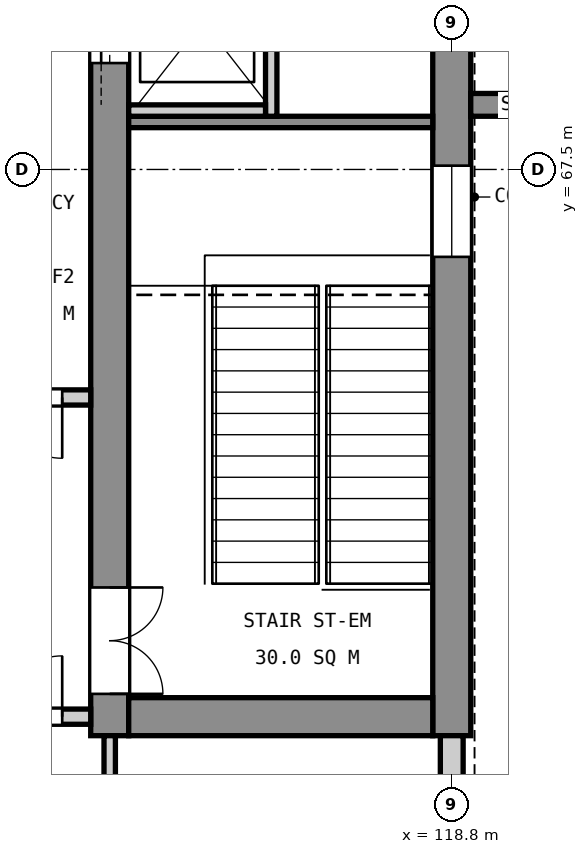
"""IFC4 building model, lengths in metres.
Left out: names, types, materials, properties, quantities, classifications, styles, units other than length and angle.
Written with IfcOpenShell. Run it as: python <this file> out.ifc"""

import sys

from ifc_helpers import new_model, si_unit, direction, frame, frame_2d, origin, place, context, subcontext, project, spatial, rectangle, extrude, element, fill, save


model = new_model("IFC4")
c1 = context("Model", 3, precision=1e-05, world=origin(), true_north=direction((0.0, 1.0)))
c2 = subcontext(c1, "Body", "Model", "MODEL_VIEW")
j1 = project(units=[si_unit("LENGTHUNIT", "METRE"), si_unit("PLANEANGLEUNIT", "RADIAN")], contexts=[c1])
p1 = place(None, origin())
s1 = spatial("IfcSite", under=j1, at=p1, CompositionType="ELEMENT")
p2 = place(p1, origin())
s2 = spatial("IfcBuilding", under=s1, at=p2, CompositionType="ELEMENT")
p3 = place(p2, frame((0.0, 0.0, 11.4)))
s3 = spatial("IfcBuildingStorey", under=s2, at=p3, CompositionType="ELEMENT", Elevation=11.4)
p4 = place(p3, frame((118.8, 60.05, 0.0), z_axis=(0.0, 0.0, 1.0), x_axis=(0.0, 1.0, 0.0)))
e1 = element("IfcWall", 1, at=p4, inside=s3, PredefinedType="SHEAR", context=c2, shape_type="SweptSolid", body=[
    extrude(rectangle(XDim=14.9, YDim=0.5, at=frame_2d((7.45, 0.0))), origin(), (0.0, 0.0, 1.0), 5.1),
])
p5 = place(p4, frame((6.3, 0.0, 3.4)))
e2 = element("IfcOpeningElement", 2, at=p5, cuts=e1, PredefinedType="OPENING", context=c2, shape_type="SweptSolid", body=[
    extrude(rectangle(XDim=1.2, YDim=0.9, at=frame_2d((0.6, 0.45))), frame((0.0, 0.26, 0.0), z_axis=(0.0, -1.0, 0.0), x_axis=(1.0, 0.0, 0.0)), (0.0, 0.0, 1.0), 0.52),
])
p6 = place(p3, frame((114.3, 60.05, 0.0), z_axis=(0.0, 0.0, 1.0), x_axis=(0.0, 1.0, 0.0)))
e3 = element("IfcWall", 3, at=p6, inside=s3, PredefinedType="SHEAR", context=c2, shape_type="SweptSolid", body=[
    extrude(rectangle(XDim=14.9, YDim=0.5, at=frame_2d((7.45, 0.0))), origin(), (0.0, 0.0, 1.0), 5.1),
])
p7 = place(p6, frame((0.55, 0.0, 0.0)))
e4 = element("IfcOpeningElement", 4, at=p7, cuts=e3, PredefinedType="OPENING", context=c2, shape_type="SweptSolid", body=[
    extrude(rectangle(XDim=1.4, YDim=2.1, at=frame_2d((0.7, 1.05))), frame((0.0, 0.26, 0.0), z_axis=(0.0, -1.0, 0.0), x_axis=(1.0, 0.0, 0.0)), (0.0, 0.0, 1.0), 0.52),
])
p8 = place(p6, frame((8.85, 0.0, 0.0)))
e5 = element("IfcOpeningElement", 5, at=p8, cuts=e3, PredefinedType="OPENING", context=c2, shape_type="SweptSolid", body=[
    extrude(rectangle(XDim=1.1, YDim=2.1, at=frame_2d((0.55, 1.05))), frame((0.0, 0.26, 0.0), z_axis=(0.0, -1.0, 0.0), x_axis=(1.0, 0.0, 0.0)), (0.0, 0.0, 1.0), 0.52),
])
p9 = place(p6, frame((11.4, 0.0, 0.0)))
e6 = element("IfcOpeningElement", 6, at=p9, cuts=e3, PredefinedType="OPENING", context=c2, shape_type="SweptSolid", body=[
    extrude(rectangle(XDim=1.1, YDim=2.1, at=frame_2d((0.55, 1.05))), frame((0.0, 0.26, 0.0), z_axis=(0.0, -1.0, 0.0), x_axis=(1.0, 0.0, 0.0)), (0.0, 0.0, 1.0), 0.52),
])
p10 = place(p3, frame((118.55, 60.3, 0.0), z_axis=(0.0, 0.0, 1.0), x_axis=(-1.0, 0.0, 0.0)))
e7 = element("IfcWall", 7, at=p10, inside=s3, PredefinedType="SHEAR", context=c2, shape_type="SweptSolid", body=[
    extrude(rectangle(XDim=4.0, YDim=0.5, at=frame_2d((2.0, 0.0))), origin(), (0.0, 0.0, 1.0), 5.1),
])
p11 = place(p3, frame((119.05, 68.35, 0.0), z_axis=(0.0, 0.0, 1.0), x_axis=(1.0, 0.0, 0.0)))
e8 = element("IfcWall", 8, at=p11, inside=s3, PredefinedType="SHEAR", context=c2, shape_type="SweptSolid", body=[
    extrude(rectangle(XDim=1.25, YDim=0.3, at=frame_2d((0.625, 0.0))), origin(), (0.0, 0.0, 1.0), 5.4),
])
p12 = place(p3, frame((118.55, 68.125, 0.0), z_axis=(0.0, 0.0, 1.0), x_axis=(-1.0, 0.0, 0.0)))
e9 = element("IfcWall", 9, at=p12, inside=s3, PredefinedType="SOLIDWALL", context=c2, shape_type="SweptSolid", body=[
    extrude(rectangle(XDim=4.0, YDim=0.15, at=frame_2d((2.0, 0.0))), origin(), (0.0, 0.0, 1.0), 5.1),
])
p13 = place(p3, frame((116.425, 68.2, 0.0), z_axis=(0.0, 0.0, 1.0), x_axis=(0.0, 1.0, 0.0)))
e10 = element("IfcWall", 10, at=p13, inside=s3, PredefinedType="SOLIDWALL", context=c2, shape_type="SweptSolid", body=[
    extrude(rectangle(XDim=2.5, YDim=0.15, at=frame_2d((1.25, 0.0))), origin(), (0.0, 0.0, 1.0), 5.4),
])
p14 = place(p3, frame((116.35, 68.275, 0.0), z_axis=(0.0, 0.0, 1.0), x_axis=(-1.0, 0.0, 0.0)))
e11 = element("IfcWall", 11, at=p14, inside=s3, PredefinedType="SOLIDWALL", context=c2, shape_type="SweptSolid", body=[
    extrude(rectangle(XDim=1.8, YDim=0.15, at=frame_2d((0.9, 0.0))), origin(), (0.0, 0.0, 1.0), 5.4),
])
p15 = place(p3, frame((118.8, 57.25, 0.0), z_axis=(0.0, 0.0, 1.0), x_axis=(0.0, 1.0, 0.0)))
e12 = element("IfcWall", 12, at=p15, inside=s3, PredefinedType="STANDARD", context=c2, shape_type="SweptSolid", body=[
    extrude(rectangle(XDim=2.8, YDim=0.3, at=frame_2d((1.4, 0.0))), origin(), (0.0, 0.0, 1.0), 4.1),
])
p16 = place(p15, frame((1.025, 0.0, 0.8)))
e13 = element("IfcOpeningElement", 13, at=p16, cuts=e12, PredefinedType="OPENING", context=c2, shape_type="SweptSolid", body=[
    extrude(rectangle(XDim=0.75, YDim=1.2, at=frame_2d((0.375, 0.6))), frame((0.0, 0.16, 0.0), z_axis=(0.0, -1.0, 0.0), x_axis=(1.0, 0.0, 0.0)), (0.0, 0.0, 1.0), 0.32),
])
p17 = place(p3, frame((114.3, 56.85, 0.0), z_axis=(0.0, 0.0, 1.0), x_axis=(0.0, 1.0, 0.0)))
e14 = element("IfcWall", 14, at=p17, inside=s3, PredefinedType="PARTITIONING", context=c2, shape_type="SweptSolid", body=[
    extrude(rectangle(XDim=3.2, YDim=0.15, at=frame_2d((1.6, 0.0))), origin(), (0.0, 0.0, 1.0), 4.0),
])
p18 = place(p17, frame((1.15, 0.0, 0.0)))
e15 = element("IfcOpeningElement", 15, at=p18, cuts=e14, PredefinedType="OPENING", context=c2, shape_type="SweptSolid", body=[
    extrude(rectangle(XDim=1.0, YDim=2.1, at=frame_2d((0.5, 1.05))), frame((0.0, 0.085, 0.0), z_axis=(0.0, -1.0, 0.0), x_axis=(1.0, 0.0, 0.0)), (0.0, 0.0, 1.0), 0.17),
])
p19 = place(p3, frame((114.05, 60.3, 0.0), z_axis=(0.0, 0.0, 1.0), x_axis=(-1.0, 0.0, 0.0)))
e16 = element("IfcWall", 16, at=p19, inside=s3, PredefinedType="PARTITIONING", context=c2, shape_type="SweptSolid", body=[
    extrude(rectangle(XDim=2.35, YDim=0.2, at=frame_2d((1.175, 0.0))), origin(), (0.0, 0.0, 1.0), 4.3),
])
p20 = place(p19, frame((0.375, 0.0, 0.0)))
e17 = element("IfcOpeningElement", 17, at=p20, cuts=e16, PredefinedType="OPENING", context=c2, shape_type="SweptSolid", body=[
    extrude(rectangle(XDim=1.6, YDim=2.1, at=frame_2d((0.8, 1.05))), frame((0.0, 0.11, 0.0), z_axis=(0.0, -1.0, 0.0), x_axis=(1.0, 0.0, 0.0)), (0.0, 0.0, 1.0), 0.22),
])
p21 = place(p3, frame((114.05, 64.5, 0.0), z_axis=(0.0, 0.0, 1.0), x_axis=(-1.0, 0.0, 0.0)))
e18 = element("IfcWall", 18, at=p21, inside=s3, PredefinedType="PARTITIONING", context=c2, shape_type="SweptSolid", body=[
    extrude(rectangle(XDim=2.35, YDim=0.2, at=frame_2d((1.175, 0.0))), origin(), (0.0, 0.0, 1.0), 4.0),
])
p22 = place(p21, frame((0.375, 0.0, 0.0)))
e19 = element("IfcOpeningElement", 19, at=p22, cuts=e18, PredefinedType="OPENING", context=c2, shape_type="SweptSolid", body=[
    extrude(rectangle(XDim=1.6, YDim=2.1, at=frame_2d((0.8, 1.05))), frame((0.0, 0.11, 0.0), z_axis=(0.0, -1.0, 0.0), x_axis=(1.0, 0.0, 0.0)), (0.0, 0.0, 1.0), 0.22),
])
p23 = place(p7, frame((1.4, 0.0, 0.0), z_axis=(0.0, 0.0, 1.0), x_axis=(-1.0, 0.0, 0.0)))
e20 = element("IfcDoor", 20, at=p23, inside=s3, OperationType="DOUBLE_DOOR_SINGLE_SWING", PredefinedType="DOOR", context=c2, shape_type="SweptSolid", body=[
    extrude(rectangle(XDim=1.4, YDim=2.1, at=frame_2d((0.7, 1.05))), frame((0.0, 0.025, 0.0), z_axis=(0.0, -1.0, 0.0), x_axis=(1.0, 0.0, 0.0)), (0.0, 0.0, 1.0), 0.05),
])
fill(e4, e20)
p24 = place(p8, origin())
e21 = element("IfcDoor", 21, at=p24, inside=s3, OperationType="SLIDING_TO_LEFT", PredefinedType="DOOR", context=c2, shape_type="SweptSolid", body=[
    extrude(rectangle(XDim=1.1, YDim=2.1, at=frame_2d((0.55, 1.05))), frame((0.0, 0.025, 0.0), z_axis=(0.0, -1.0, 0.0), x_axis=(1.0, 0.0, 0.0)), (0.0, 0.0, 1.0), 0.05),
])
fill(e5, e21)
p25 = place(p5, origin())
e22 = element("IfcWindow", 22, at=p25, inside=s3, PartitioningType="SINGLE_PANEL", PredefinedType="WINDOW", context=c2, shape_type="SweptSolid", body=[
    extrude(rectangle(XDim=1.2, YDim=0.9, at=frame_2d((0.6, 0.45))), frame((0.0, 0.03, 0.0), z_axis=(0.0, -1.0, 0.0), x_axis=(1.0, 0.0, 0.0)), (0.0, 0.0, 1.0), 0.06),
])
fill(e2, e22)
p26 = place(p20, frame((1.6, 0.0, 0.0), z_axis=(0.0, 0.0, 1.0), x_axis=(-1.0, 0.0, 0.0)))
e23 = element("IfcDoor", 23, at=p26, inside=s3, OperationType="DOUBLE_DOOR_SINGLE_SWING", PredefinedType="DOOR", context=c2, shape_type="SweptSolid", body=[
    extrude(rectangle(XDim=1.6, YDim=2.1, at=frame_2d((0.8, 1.05))), frame((0.0, 0.025, 0.0), z_axis=(0.0, -1.0, 0.0), x_axis=(1.0, 0.0, 0.0)), (0.0, 0.0, 1.0), 0.05),
])
fill(e17, e23)
p27 = place(p22, origin())
e24 = element("IfcDoor", 24, at=p27, inside=s3, OperationType="DOUBLE_DOOR_SINGLE_SWING", PredefinedType="DOOR", context=c2, shape_type="SweptSolid", body=[
    extrude(rectangle(XDim=1.6, YDim=2.1, at=frame_2d((0.8, 1.05))), frame((0.0, 0.025, 0.0), z_axis=(0.0, -1.0, 0.0), x_axis=(1.0, 0.0, 0.0)), (0.0, 0.0, 1.0), 0.05),
])
fill(e19, e24)
save(model, sys.argv[1])
